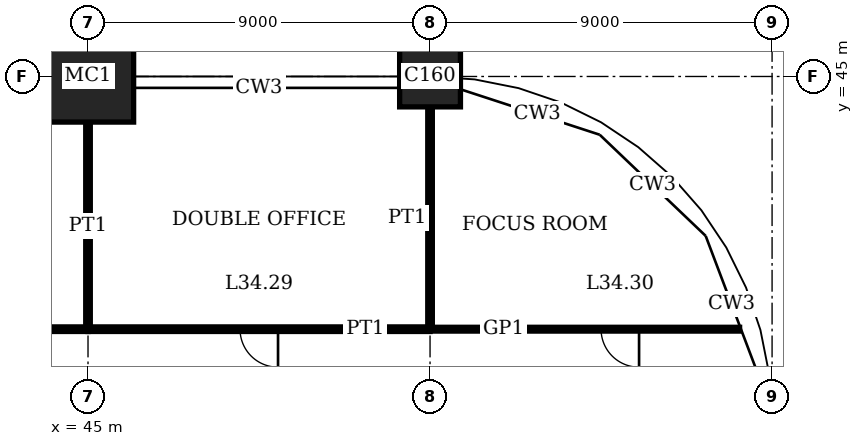
"""IFC4 building model, lengths in metres.
Left out: names, types, materials, properties, quantities, classifications, styles, units other than length and angle.
Written with IfcOpenShell. Run it as: python <this file> out.ifc"""

import sys

from ifc_helpers import new_model, si_unit, direction, frame, frame_2d, origin, origin_2d, place, context, subcontext, project, spatial, rectangle, extrude, element, fill, save


model = new_model("IFC4")
c1 = context("Model", 3, precision=1e-05, world=origin(), true_north=direction((0.0, 1.0)))
c2 = subcontext(c1, "Body", "Model", "MODEL_VIEW")
j1 = project(units=[si_unit("LENGTHUNIT", "METRE"), si_unit("PLANEANGLEUNIT", "RADIAN")], contexts=[c1])
p1 = place(None, origin())
s1 = spatial("IfcSite", under=j1, at=p1, CompositionType="ELEMENT")
p2 = place(p1, origin())
s2 = spatial("IfcBuilding", under=s1, at=p2, CompositionType="ELEMENT")
p3 = place(p2, frame((0.0, 0.0, 141.0)))
s3 = spatial("IfcBuildingStorey", under=s2, at=p3, CompositionType="ELEMENT", Elevation=141.0)
p4 = place(p3, frame((45.0, 45.0, 0.0), z_axis=(0.0, 0.0, 1.0), x_axis=(1.0, 0.0, 0.0)))
e1 = element("IfcColumn", 1, at=p4, inside=s3, PredefinedType="COLUMN", context=c2, shape_type="SweptSolid", body=[
    extrude(rectangle(XDim=2.4, YDim=2.4, at=origin_2d()), origin(), (0.0, 0.0, 1.0), 4.0),
])
p5 = place(p3, frame((54.0, 45.0, 0.0), z_axis=(0.0, 0.0, 1.0), x_axis=(1.0, 0.0, 0.0)))
e2 = element("IfcColumn", 2, at=p5, inside=s3, PredefinedType="COLUMN", context=c2, shape_type="SweptSolid", body=[
    extrude(rectangle(XDim=1.6, YDim=1.6, at=origin_2d()), origin(), (0.0, 0.0, 1.0), 4.0),
])
p6 = place(p3, frame((36.0, 38.35, 0.0), z_axis=(0.0, 0.0, 1.0), x_axis=(1.0, 0.0, 0.0)))
e3 = element("IfcWall", 3, at=p6, inside=s3, PredefinedType="PARTITIONING", context=c2, shape_type="SweptSolid", body=[
    extrude(rectangle(XDim=9.0, YDim=0.12, at=frame_2d((4.5, 0.0))), origin(), (0.0, 0.0, 1.0), 3.75),
])
p7 = place(p6, frame((4.0, 0.0, 0.0)))
e4 = element("IfcOpeningElement", 4, at=p7, cuts=e3, PredefinedType="OPENING", context=c2, shape_type="SweptSolid", body=[
    extrude(rectangle(XDim=1.0, YDim=2.4, at=frame_2d((0.5, 1.2))), frame((0.0, 0.07, 0.0), z_axis=(0.0, -1.0, 0.0), x_axis=(1.0, 0.0, 0.0)), (0.0, 0.0, 1.0), 0.14),
])
p8 = place(p3, frame((45.0, 38.35, 0.0), z_axis=(0.0, 0.0, 1.0), x_axis=(1.0, 0.0, 0.0)))
e5 = element("IfcWall", 5, at=p8, inside=s3, PredefinedType="PARTITIONING", context=c2, shape_type="SweptSolid", body=[
    extrude(rectangle(XDim=9.0, YDim=0.12, at=frame_2d((4.5, 0.0))), origin(), (0.0, 0.0, 1.0), 3.75),
])
p9 = place(p8, frame((4.0, 0.0, 0.0)))
e6 = element("IfcOpeningElement", 6, at=p9, cuts=e5, PredefinedType="OPENING", context=c2, shape_type="SweptSolid", body=[
    extrude(rectangle(XDim=1.0, YDim=2.4, at=frame_2d((0.5, 1.2))), frame((0.0, 0.07, 0.0), z_axis=(0.0, -1.0, 0.0), x_axis=(1.0, 0.0, 0.0)), (0.0, 0.0, 1.0), 0.14),
])
p10 = place(p3, frame((54.0, 38.35, 0.0), z_axis=(0.0, 0.0, 1.0), x_axis=(1.0, 0.0, 0.0)))
e7 = element("IfcWall", 7, at=p10, inside=s3, PredefinedType="PARTITIONING", context=c2, shape_type="SweptSolid", body=[
    extrude(rectangle(XDim=8.146, YDim=0.1, at=frame_2d((4.073, 0.0))), origin(), (0.0, 0.0, 1.0), 3.75),
])
p11 = place(p10, frame((4.5, 0.0, 0.0)))
e8 = element("IfcOpeningElement", 8, at=p11, cuts=e7, PredefinedType="OPENING", context=c2, shape_type="SweptSolid", body=[
    extrude(rectangle(XDim=1.0, YDim=2.4, at=frame_2d((0.5, 1.2))), frame((0.0, 0.06, 0.0), z_axis=(0.0, -1.0, 0.0), x_axis=(1.0, 0.0, 0.0)), (0.0, 0.0, 1.0), 0.12),
])
p12 = place(p3, frame((45.0, 38.35, 0.0), z_axis=(0.0, 0.0, 1.0), x_axis=(0.0, 1.0, 0.0)))
e9 = element("IfcWall", 9, at=p12, inside=s3, PredefinedType="PARTITIONING", context=c2, shape_type="SweptSolid", body=[
    extrude(rectangle(XDim=5.45, YDim=0.12, at=frame_2d((2.725, 0.0))), origin(), (0.0, 0.0, 1.0), 3.05),
])
p13 = place(p3, frame((54.0, 38.35, 0.0), z_axis=(0.0, 0.0, 1.0), x_axis=(0.0, 1.0, 0.0)))
e10 = element("IfcWall", 10, at=p13, inside=s3, PredefinedType="PARTITIONING", context=c2, shape_type="SweptSolid", body=[
    extrude(rectangle(XDim=5.85, YDim=0.12, at=frame_2d((2.925, 0.0))), origin(), (0.0, 0.0, 1.0), 3.05),
])
p14 = place(p9, origin())
e11 = element("IfcDoor", 11, at=p14, inside=s3, OperationType="SINGLE_SWING_RIGHT", PredefinedType="DOOR", context=c2, shape_type="SweptSolid", body=[
    extrude(rectangle(XDim=1.0, YDim=2.4, at=frame_2d((0.5, 1.2))), frame((0.0, 0.025, 0.0), z_axis=(0.0, -1.0, 0.0), x_axis=(1.0, 0.0, 0.0)), (0.0, 0.0, 1.0), 0.05),
])
fill(e6, e11)
p15 = place(p11, origin())
e12 = element("IfcDoor", 12, at=p15, inside=s3, OperationType="SINGLE_SWING_RIGHT", PredefinedType="DOOR", context=c2, shape_type="SweptSolid", body=[
    extrude(rectangle(XDim=1.0, YDim=2.4, at=frame_2d((0.5, 1.2))), frame((0.0, 0.02, 0.0), z_axis=(0.0, -1.0, 0.0), x_axis=(1.0, 0.0, 0.0)), (0.0, 0.0, 1.0), 0.04),
])
fill(e8, e12)
save(model, sys.argv[1])
